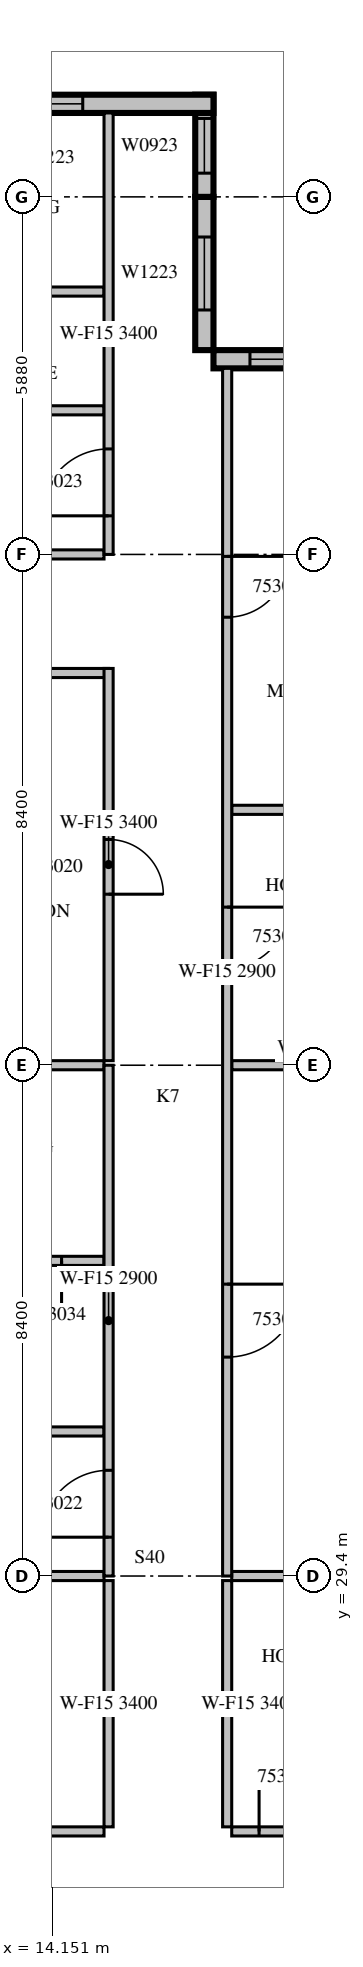
"""IFC4 building model, lengths in metres.
Left out: names, types, materials, properties, quantities, classifications, styles, units other than length and angle.
Written with IfcOpenShell. Run it as: python <this file> out.ifc"""

import sys

from ifc_helpers import new_model, si_unit, direction, frame, frame_2d, origin, place, context, subcontext, project, spatial, rectangle, extrude, source, transform, mapped, element, fill, save


model = new_model("IFC4")
c1 = context("Model", 3, precision=1e-05, world=origin(), true_north=direction((0.0, 1.0)))
c2 = subcontext(c1, "Body", "Model", "MODEL_VIEW")
j1 = project(units=[si_unit("LENGTHUNIT", "METRE"), si_unit("PLANEANGLEUNIT", "RADIAN")], contexts=[c1])
p1 = place(None, origin())
s1 = spatial("IfcSite", under=j1, at=p1, CompositionType="ELEMENT")
p2 = place(p1, origin())
s2 = spatial("IfcBuilding", under=s1, at=p2, CompositionType="ELEMENT")
p3 = place(p2, frame((0.0, 0.0, 234.8)))
s3 = spatial("IfcBuildingStorey", under=s2, at=p3, CompositionType="ELEMENT", Elevation=234.8)
m1 = source(origin(), c2, "Body", "SweptSolid", [
    extrude(rectangle(XDim=4.2, YDim=0.3, at=frame_2d((2.1, 0.0))), origin(), (0.0, 0.0, 1.0), 3.4),
])
p4 = place(p3, frame((21.0, 49.41, 0.0), z_axis=(0.0, 0.0, 1.0), x_axis=(-1.0, 0.0, 0.0)))
e1 = element("IfcWall", 1, at=p4, inside=s3, PredefinedType="STANDARD", context=c2, shape_type="MappedRepresentation", body=[
    mapped(m1, transform((0.0, 0.0, 0.0), scale=1.0)),
])
m2 = source(origin(), c2, "Body", "SweptSolid", [
    extrude(rectangle(XDim=3.0, YDim=2.3, at=frame_2d((1.5, 1.15))), frame((0.0, 0.16, 0.0), z_axis=(0.0, -1.0, 0.0), x_axis=(1.0, 0.0, 0.0)), (0.0, 0.0, 1.0), 0.32),
])
p5 = place(p4, frame((0.6, 0.0, 0.6)))
e2 = element("IfcOpeningElement", 2, at=p5, cuts=e1, PredefinedType="OPENING", context=c2, shape_type="MappedRepresentation", body=[
    mapped(m2, transform((0.0, 0.0, 0.0), scale=1.0)),
])
m3 = source(origin(), c2, "Body", "SweptSolid", [
    extrude(rectangle(XDim=2.52, YDim=0.3, at=frame_2d((1.26, 0.0))), origin(), (0.0, 0.0, 1.0), 3.4),
])
p6 = place(p3, frame((16.65, 49.56, 0.0), z_axis=(0.0, 0.0, 1.0), x_axis=(0.0, 1.0, 0.0)))
e3 = element("IfcWall", 3, at=p6, inside=s3, PredefinedType="STANDARD", context=c2, shape_type="MappedRepresentation", body=[
    mapped(m3, transform((0.0, 0.0, 0.0), scale=1.0)),
])
m4 = source(origin(), c2, "Body", "SweptSolid", [
    extrude(rectangle(XDim=1.2, YDim=2.3, at=frame_2d((0.6, 1.15))), frame((0.0, 0.16, 0.0), z_axis=(0.0, -1.0, 0.0), x_axis=(1.0, 0.0, 0.0)), (0.0, 0.0, 1.0), 0.32),
])
p7 = place(p6, frame((0.66, 0.0, 0.6)))
e4 = element("IfcOpeningElement", 4, at=p7, cuts=e3, PredefinedType="OPENING", context=c2, shape_type="MappedRepresentation", body=[
    mapped(m4, transform((0.0, 0.0, 0.0), scale=1.0)),
])
m5 = source(origin(), c2, "Body", "SweptSolid", [
    extrude(rectangle(XDim=1.68, YDim=0.3, at=frame_2d((0.84, 0.0))), origin(), (0.0, 0.0, 1.0), 3.4),
])
p8 = place(p3, frame((16.65, 52.08, 0.0), z_axis=(0.0, 0.0, 1.0), x_axis=(0.0, 1.0, 0.0)))
e5 = element("IfcWall", 5, at=p8, inside=s3, PredefinedType="STANDARD", context=c2, shape_type="MappedRepresentation", body=[
    mapped(m5, transform((0.0, 0.0, 0.0), scale=1.0)),
])
m6 = source(origin(), c2, "Body", "SweptSolid", [
    extrude(rectangle(XDim=0.9, YDim=2.3, at=frame_2d((0.45, 1.15))), frame((0.0, 0.16, 0.0), z_axis=(0.0, -1.0, 0.0), x_axis=(1.0, 0.0, 0.0)), (0.0, 0.0, 1.0), 0.32),
])
p9 = place(p8, frame((0.39, 0.0, 0.6)))
e6 = element("IfcOpeningElement", 6, at=p9, cuts=e5, PredefinedType="OPENING", context=c2, shape_type="MappedRepresentation", body=[
    mapped(m6, transform((0.0, 0.0, 0.0), scale=1.0)),
])
m7 = source(origin(), c2, "Body", "SweptSolid", [
    extrude(rectangle(XDim=10.5, YDim=0.3, at=frame_2d((5.25, 0.0))), origin(), (0.0, 0.0, 1.0), 3.4),
])
p10 = place(p3, frame((16.8, 53.61, 0.0), z_axis=(0.0, 0.0, 1.0), x_axis=(-1.0, 0.0, 0.0)))
e7 = element("IfcWall", 7, at=p10, inside=s3, PredefinedType="STANDARD", context=c2, shape_type="MappedRepresentation", body=[
    mapped(m7, transform((0.0, 0.0, 0.0), scale=1.0)),
])
p11 = place(p10, frame((2.15, 0.0, 0.6)))
e8 = element("IfcOpeningElement", 8, at=p11, cuts=e7, PredefinedType="OPENING", context=c2, shape_type="MappedRepresentation", body=[
    mapped(m4, transform((0.0, 0.0, 0.0), scale=1.0)),
])
m8 = source(origin(), c2, "Body", "SweptSolid", [
    extrude(rectangle(XDim=1.8, YDim=2.3, at=frame_2d((0.9, 1.15))), frame((0.0, 0.16, 0.0), z_axis=(0.0, -1.0, 0.0), x_axis=(1.0, 0.0, 0.0)), (0.0, 0.0, 1.0), 0.32),
])
p12 = place(p10, frame((8.025, 0.0, 0.6)))
e9 = element("IfcOpeningElement", 9, at=p12, cuts=e7, PredefinedType="OPENING", context=c2, shape_type="MappedRepresentation", body=[
    mapped(m8, transform((0.0, 0.0, 0.0), scale=1.0)),
])
m9 = source(origin(), c2, "Body", "SweptSolid", [
    extrude(rectangle(XDim=4.295, YDim=0.15, at=frame_2d((2.147, 0.0))), origin(), (0.0, 0.0, 1.0), 3.4),
])
p13 = place(p3, frame((10.705, 25.2, 0.0), z_axis=(0.0, 0.0, 1.0), x_axis=(1.0, 0.0, 0.0)))
e10 = element("IfcWall", 10, at=p13, inside=s3, PredefinedType="PARTITIONING", context=c2, shape_type="MappedRepresentation", body=[
    mapped(m9, transform((0.0, 0.0, 0.0), scale=1.0)),
])
m10 = source(origin(), c2, "Body", "SweptSolid", [
    extrude(rectangle(XDim=0.9, YDim=2.1, at=frame_2d((0.45, 1.05))), frame((0.0, 0.085, 0.0), z_axis=(0.0, -1.0, 0.0), x_axis=(1.0, 0.0, 0.0)), (0.0, 0.0, 1.0), 0.17),
])
p14 = place(p13, frame((2.283, 0.0, 0.0)))
e11 = element("IfcOpeningElement", 11, at=p14, cuts=e10, PredefinedType="OPENING", context=c2, shape_type="MappedRepresentation", body=[
    mapped(m10, transform((0.0, 0.0, 0.0), scale=1.0)),
])
m11 = source(origin(), c2, "Body", "SweptSolid", [
    extrude(rectangle(XDim=3.6, YDim=0.15, at=frame_2d((1.8, 0.0))), origin(), (0.0, 0.0, 1.0), 3.4),
])
p15 = place(p3, frame((17.1, 25.2, 0.0), z_axis=(0.0, 0.0, 1.0), x_axis=(1.0, 0.0, 0.0)))
e12 = element("IfcWall", 12, at=p15, inside=s3, PredefinedType="PARTITIONING", context=c2, shape_type="MappedRepresentation", body=[
    mapped(m11, transform((0.0, 0.0, 0.0), scale=1.0)),
])
p16 = place(p15, frame((0.45, 0.0, 0.0)))
e13 = element("IfcOpeningElement", 13, at=p16, cuts=e12, PredefinedType="OPENING", context=c2, shape_type="MappedRepresentation", body=[
    mapped(m10, transform((0.0, 0.0, 0.0), scale=1.0)),
])
m12 = source(origin(), c2, "Body", "SweptSolid", [
    extrude(rectangle(XDim=4.05, YDim=0.15, at=frame_2d((2.025, 0.0))), origin(), (0.0, 0.0, 1.0), 3.4),
])
for number, where, z_axis, x_axis in (
    (14, (15.075, 25.275, 0.0), (0.0, 0.0, 1.0), (0.0, 1.0, 0.0)),
    (15, (17.025, 29.325, 0.0), (0.0, 0.0, 1.0), (0.0, -1.0, 0.0)),
):
    element("IfcWall", number, at=place(p3, frame(where, z_axis=z_axis, x_axis=x_axis)), inside=s3, PredefinedType="PARTITIONING", context=c2, shape_type="MappedRepresentation", body=[
        mapped(m12, transform((0.0, 0.0, 0.0), scale=1.0)),
    ])
m13 = source(origin(), c2, "Body", "SweptSolid", [
    extrude(rectangle(XDim=4.101, YDim=0.15, at=frame_2d((2.05, 0.0))), origin(), (0.0, 0.0, 1.0), 3.4),
])
p17 = place(p3, frame((15.0, 29.4, 0.0), z_axis=(0.0, 0.0, 1.0), x_axis=(-1.0, 0.0, 0.0)))
e16 = element("IfcWall", 16, at=p17, inside=s3, PredefinedType="PARTITIONING", context=c2, shape_type="MappedRepresentation", body=[
    mapped(m13, transform((0.0, 0.0, 0.0), scale=1.0)),
])
m14 = source(origin(), c2, "Body", "SweptSolid", [
    extrude(rectangle(XDim=3.101, YDim=0.15, at=frame_2d((1.55, 0.0))), origin(), (0.0, 0.0, 1.0), 3.4),
])
p18 = place(p3, frame((20.201, 29.4, 0.0), z_axis=(0.0, 0.0, 1.0), x_axis=(-1.0, 0.0, 0.0)))
e17 = element("IfcWall", 17, at=p18, inside=s3, PredefinedType="PARTITIONING", context=c2, shape_type="MappedRepresentation", body=[
    mapped(m14, transform((0.0, 0.0, 0.0), scale=1.0)),
])
m15 = source(origin(), c2, "Body", "SweptSolid", [
    extrude(rectangle(XDim=3.975, YDim=0.15, at=frame_2d((1.988, 0.0))), origin(), (0.0, 0.0, 1.0), 3.4),
])
p19 = place(p3, frame((15.075, 44.25, 0.0), z_axis=(0.0, 0.0, 1.0), x_axis=(-1.0, 0.0, 0.0)))
e18 = element("IfcWall", 18, at=p19, inside=s3, PredefinedType="PARTITIONING", context=c2, shape_type="MappedRepresentation", body=[
    mapped(m15, transform((0.0, 0.0, 0.0), scale=1.0)),
])
m16 = source(origin(), c2, "Body", "SweptSolid", [
    extrude(rectangle(XDim=6.45, YDim=0.15, at=frame_2d((3.225, 0.0))), origin(), (0.0, 0.0, 1.0), 3.4),
])
p20 = place(p3, frame((15.075, 37.875, 0.0), z_axis=(0.0, 0.0, 1.0), x_axis=(0.0, 1.0, 0.0)))
e19 = element("IfcWall", 19, at=p20, inside=s3, PredefinedType="PARTITIONING", context=c2, shape_type="MappedRepresentation", body=[
    mapped(m16, transform((0.0, 0.0, 0.0), scale=1.0)),
])
p21 = place(p20, frame((2.737, 0.0, 0.0)))
e20 = element("IfcOpeningElement", 20, at=p21, cuts=e19, PredefinedType="OPENING", context=c2, shape_type="MappedRepresentation", body=[
    mapped(m10, transform((0.0, 0.0, 0.0), scale=1.0)),
])
p22 = place(p3, frame((15.0, 31.777, 0.0), z_axis=(0.0, 0.0, 1.0), x_axis=(-1.0, 0.0, 0.0)))
e21 = element("IfcWall", 21, at=p22, inside=s3, PredefinedType="PARTITIONING", context=c2, shape_type="MappedRepresentation", body=[
    mapped(m9, transform((0.0, 0.0, 0.0), scale=1.0)),
])
p23 = place(p22, frame((1.698, 0.0, 0.0)))
e22 = element("IfcOpeningElement", 22, at=p23, cuts=e21, PredefinedType="OPENING", context=c2, shape_type="MappedRepresentation", body=[
    mapped(m10, transform((0.0, 0.0, 0.0), scale=1.0)),
])
p24 = place(p3, frame((15.0, 34.583, 0.0), z_axis=(0.0, 0.0, 1.0), x_axis=(-1.0, 0.0, 0.0)))
e23 = element("IfcWall", 23, at=p24, inside=s3, PredefinedType="PARTITIONING", context=c2, shape_type="MappedRepresentation", body=[
    mapped(m9, transform((0.0, 0.0, 0.0), scale=1.0)),
])
p25 = place(p24, frame((1.698, 0.0, 0.0)))
e24 = element("IfcOpeningElement", 24, at=p25, cuts=e23, PredefinedType="OPENING", context=c2, shape_type="MappedRepresentation", body=[
    mapped(m10, transform((0.0, 0.0, 0.0), scale=1.0)),
])
p26 = place(p24, frame((0.698, 0.0, 0.0)))
e25 = element("IfcOpeningElement", 25, at=p26, cuts=e23, PredefinedType="OPENING", context=c2, shape_type="MappedRepresentation", body=[
    mapped(m10, transform((0.0, 0.0, 0.0), scale=1.0)),
])
p27 = place(p24, frame((2.698, 0.0, 0.0)))
e26 = element("IfcOpeningElement", 26, at=p27, cuts=e23, PredefinedType="OPENING", context=c2, shape_type="MappedRepresentation", body=[
    mapped(m10, transform((0.0, 0.0, 0.0), scale=1.0)),
])
p28 = place(p3, frame((15.0, 37.8, 0.0), z_axis=(0.0, 0.0, 1.0), x_axis=(-1.0, 0.0, 0.0)))
e27 = element("IfcWall", 27, at=p28, inside=s3, PredefinedType="PARTITIONING", context=c2, shape_type="MappedRepresentation", body=[
    mapped(m13, transform((0.0, 0.0, 0.0), scale=1.0)),
])
m17 = source(origin(), c2, "Body", "SweptSolid", [
    extrude(rectangle(XDim=3.95, YDim=0.15, at=frame_2d((1.975, 0.0))), origin(), (0.0, 0.0, 1.0), 3.4),
])
for number, where, z_axis, x_axis in (
    (28, (15.0, 48.57, 0.0), (0.0, 0.0, 1.0), (-1.0, 0.0, 0.0)),
    (29, (15.0, 50.523, 0.0), (0.0, 0.0, 1.0), (-1.0, 0.0, 0.0)),
    (30, (15.0, 46.2, 0.0), (0.0, 0.0, 1.0), (-1.0, 0.0, 0.0)),
):
    element("IfcWall", number, at=place(p3, frame(where, z_axis=z_axis, x_axis=x_axis)), inside=s3, PredefinedType="PARTITIONING", context=c2, shape_type="MappedRepresentation", body=[
        mapped(m17, transform((0.0, 0.0, 0.0), scale=1.0)),
    ])
p29 = place(p3, frame((20.201, 37.8, 0.0), z_axis=(0.0, 0.0, 1.0), x_axis=(-1.0, 0.0, 0.0)))
e31 = element("IfcWall", 31, at=p29, inside=s3, PredefinedType="PARTITIONING", context=c2, shape_type="MappedRepresentation", body=[
    mapped(m14, transform((0.0, 0.0, 0.0), scale=1.0)),
])
p30 = place(p3, frame((20.7, 42.0, 0.0), z_axis=(0.0, 0.0, 1.0), x_axis=(-1.0, 0.0, 0.0)))
e32 = element("IfcWall", 32, at=p30, inside=s3, PredefinedType="PARTITIONING", context=c2, shape_type="MappedRepresentation", body=[
    mapped(m11, transform((0.0, 0.0, 0.0), scale=1.0)),
])
m18 = source(origin(), c2, "Body", "SweptSolid", [
    extrude(rectangle(XDim=8.4, YDim=0.15, at=frame_2d((4.2, 0.0))), origin(), (0.0, 0.0, 1.0), 2.9),
])
p31 = place(p3, frame((15.075, 29.4, 0.0), z_axis=(0.0, 0.0, 1.0), x_axis=(0.0, 1.0, 0.0)))
e33 = element("IfcWall", 33, at=p31, inside=s3, PredefinedType="PARTITIONING", context=c2, shape_type="MappedRepresentation", body=[
    mapped(m18, transform((0.0, 0.0, 0.0), scale=1.0)),
])
m19 = source(origin(), c2, "Body", "SweptSolid", [
    extrude(rectangle(XDim=1.1, YDim=2.1, at=frame_2d((0.55, 1.05))), frame((0.0, 0.085, 0.0), z_axis=(0.0, -1.0, 0.0), x_axis=(1.0, 0.0, 0.0)), (0.0, 0.0, 1.0), 0.17),
])
p32 = place(p31, frame((0.638, 0.0, 0.0)))
e34 = element("IfcOpeningElement", 34, at=p32, cuts=e33, PredefinedType="OPENING", context=c2, shape_type="MappedRepresentation", body=[
    mapped(m19, transform((0.0, 0.0, 0.0), scale=1.0)),
])
m20 = source(origin(), c2, "Body", "SweptSolid", [
    extrude(rectangle(XDim=7.26, YDim=0.15, at=frame_2d((3.63, 0.0))), origin(), (0.0, 0.0, 1.0), 3.4),
])
p33 = place(p3, frame((15.075, 46.2, 0.0), z_axis=(0.0, 0.0, 1.0), x_axis=(0.0, 1.0, 0.0)))
e35 = element("IfcWall", 35, at=p33, inside=s3, PredefinedType="PARTITIONING", context=c2, shape_type="MappedRepresentation", body=[
    mapped(m20, transform((0.0, 0.0, 0.0), scale=1.0)),
])
p34 = place(p33, frame((0.635, 0.0, 0.0)))
e36 = element("IfcOpeningElement", 36, at=p34, cuts=e35, PredefinedType="OPENING", context=c2, shape_type="MappedRepresentation", body=[
    mapped(m19, transform((0.0, 0.0, 0.0), scale=1.0)),
])
m21 = source(origin(), c2, "Body", "SweptSolid", [
    extrude(rectangle(XDim=19.86, YDim=0.15, at=frame_2d((9.93, 0.0))), origin(), (0.0, 0.0, 1.0), 2.9),
])
p35 = place(p3, frame((17.025, 49.26, 0.0), z_axis=(0.0, 0.0, 1.0), x_axis=(0.0, -1.0, 0.0)))
e37 = element("IfcWall", 37, at=p35, inside=s3, PredefinedType="PARTITIONING", context=c2, shape_type="MappedRepresentation", body=[
    mapped(m21, transform((0.0, 0.0, 0.0), scale=1.0)),
])
m22 = source(origin(), c2, "Body", "SweptSolid", [
    extrude(rectangle(XDim=1.2, YDim=2.1, at=frame_2d((0.6, 1.05))), frame((0.0, 0.085, 0.0), z_axis=(0.0, -1.0, 0.0), x_axis=(1.0, 0.0, 0.0)), (0.0, 0.0, 1.0), 0.17),
])
p36 = place(p35, frame((15.06, 0.0, 0.0)))
e38 = element("IfcOpeningElement", 38, at=p36, cuts=e37, PredefinedType="OPENING", context=c2, shape_type="MappedRepresentation", body=[
    mapped(m22, transform((0.0, 0.0, 0.0), scale=1.0)),
])
m23 = source(origin(), c2, "Body", "SweptSolid", [
    extrude(rectangle(XDim=1.0, YDim=2.1, at=frame_2d((0.5, 1.05))), frame((0.0, 0.085, 0.0), z_axis=(0.0, -1.0, 0.0), x_axis=(1.0, 0.0, 0.0)), (0.0, 0.0, 1.0), 0.17),
])
p37 = place(p35, frame((8.86, 0.0, 0.0)))
e39 = element("IfcOpeningElement", 39, at=p37, cuts=e37, PredefinedType="OPENING", context=c2, shape_type="MappedRepresentation", body=[
    mapped(m23, transform((0.0, 0.0, 0.0), scale=1.0)),
])
p38 = place(p35, frame((3.092, 0.0, 0.0)))
e40 = element("IfcOpeningElement", 40, at=p38, cuts=e37, PredefinedType="OPENING", context=c2, shape_type="MappedRepresentation", body=[
    mapped(m23, transform((0.0, 0.0, 0.0), scale=1.0)),
])
m24 = source(origin(), c2, "Body", "SweptSolid", [
    extrude(rectangle(XDim=3.0, YDim=2.3, at=frame_2d((1.5, 1.15))), frame((0.0, 0.03, 0.0), z_axis=(0.0, -1.0, 0.0), x_axis=(1.0, 0.0, 0.0)), (0.0, 0.0, 1.0), 0.06),
])
p39 = place(p5, origin())
e41 = element("IfcWindow", 41, at=p39, inside=s3, PartitioningType="SINGLE_PANEL", PredefinedType="WINDOW", context=c2, shape_type="MappedRepresentation", body=[
    mapped(m24, transform((0.0, 0.0, 0.0), scale=1.0)),
])
fill(e2, e41)
m25 = source(origin(), c2, "Body", "SweptSolid", [
    extrude(rectangle(XDim=1.2, YDim=2.3, at=frame_2d((0.6, 1.15))), frame((0.0, 0.03, 0.0), z_axis=(0.0, -1.0, 0.0), x_axis=(1.0, 0.0, 0.0)), (0.0, 0.0, 1.0), 0.06),
])
p40 = place(p7, origin())
e42 = element("IfcWindow", 42, at=p40, inside=s3, PartitioningType="SINGLE_PANEL", PredefinedType="WINDOW", context=c2, shape_type="MappedRepresentation", body=[
    mapped(m25, transform((0.0, 0.0, 0.0), scale=1.0)),
])
fill(e4, e42)
m26 = source(origin(), c2, "Body", "SweptSolid", [
    extrude(rectangle(XDim=0.9, YDim=2.3, at=frame_2d((0.45, 1.15))), frame((0.0, 0.03, 0.0), z_axis=(0.0, -1.0, 0.0), x_axis=(1.0, 0.0, 0.0)), (0.0, 0.0, 1.0), 0.06),
])
p41 = place(p9, origin())
e43 = element("IfcWindow", 43, at=p41, inside=s3, PartitioningType="SINGLE_PANEL", PredefinedType="WINDOW", context=c2, shape_type="MappedRepresentation", body=[
    mapped(m26, transform((0.0, 0.0, 0.0), scale=1.0)),
])
fill(e6, e43)
p42 = place(p11, origin())
e44 = element("IfcWindow", 44, at=p42, inside=s3, PartitioningType="SINGLE_PANEL", PredefinedType="WINDOW", context=c2, shape_type="MappedRepresentation", body=[
    mapped(m25, transform((0.0, 0.0, 0.0), scale=1.0)),
])
fill(e8, e44)
m27 = source(origin(), c2, "Body", "SweptSolid", [
    extrude(rectangle(XDim=0.9, YDim=2.1, at=frame_2d((0.45, 1.05))), frame((0.0, 0.025, 0.0), z_axis=(0.0, -1.0, 0.0), x_axis=(1.0, 0.0, 0.0)), (0.0, 0.0, 1.0), 0.05),
])
p43 = place(p16, origin())
e45 = element("IfcDoor", 45, at=p43, inside=s3, OperationType="SINGLE_SWING_LEFT", PredefinedType="DOOR", context=c2, shape_type="MappedRepresentation", body=[
    mapped(m27, transform((0.0, 0.0, 0.0), scale=1.0)),
])
fill(e13, e45)
p44 = place(p21, origin())
e46 = element("IfcDoor", 46, at=p44, inside=s3, OperationType="SINGLE_SWING_RIGHT", PredefinedType="DOOR", context=c2, shape_type="MappedRepresentation", body=[
    mapped(m27, transform((0.0, 0.0, 0.0), scale=1.0)),
])
fill(e20, e46)
m28 = source(origin(), c2, "Body", "SweptSolid", [
    extrude(rectangle(XDim=1.1, YDim=2.1, at=frame_2d((0.55, 1.05))), frame((0.0, 0.025, 0.0), z_axis=(0.0, -1.0, 0.0), x_axis=(1.0, 0.0, 0.0)), (0.0, 0.0, 1.0), 0.05),
])
p45 = place(p32, origin())
e47 = element("IfcDoor", 47, at=p45, inside=s3, OperationType="SINGLE_SWING_LEFT", PredefinedType="DOOR", context=c2, shape_type="MappedRepresentation", body=[
    mapped(m28, transform((0.0, 0.0, 0.0), scale=1.0)),
])
fill(e34, e47)
p46 = place(p34, origin())
e48 = element("IfcDoor", 48, at=p46, inside=s3, OperationType="SINGLE_SWING_LEFT", PredefinedType="DOOR", context=c2, shape_type="MappedRepresentation", body=[
    mapped(m28, transform((0.0, 0.0, 0.0), scale=1.0)),
])
fill(e36, e48)
m29 = source(origin(), c2, "Body", "SweptSolid", [
    extrude(rectangle(XDim=1.2, YDim=2.1, at=frame_2d((0.6, 1.05))), frame((0.0, 0.025, 0.0), z_axis=(0.0, -1.0, 0.0), x_axis=(1.0, 0.0, 0.0)), (0.0, 0.0, 1.0), 0.05),
])
p47 = place(p36, origin())
e49 = element("IfcDoor", 49, at=p47, inside=s3, OperationType="SINGLE_SWING_LEFT", PredefinedType="DOOR", context=c2, shape_type="MappedRepresentation", body=[
    mapped(m29, transform((0.0, 0.0, 0.0), scale=1.0)),
])
fill(e38, e49)
m30 = source(origin(), c2, "Body", "SweptSolid", [
    extrude(rectangle(XDim=1.0, YDim=2.1, at=frame_2d((0.5, 1.05))), frame((0.0, 0.025, 0.0), z_axis=(0.0, -1.0, 0.0), x_axis=(1.0, 0.0, 0.0)), (0.0, 0.0, 1.0), 0.05),
])
p48 = place(p37, origin())
e50 = element("IfcDoor", 50, at=p48, inside=s3, OperationType="SINGLE_SWING_LEFT", PredefinedType="DOOR", context=c2, shape_type="MappedRepresentation", body=[
    mapped(m30, transform((0.0, 0.0, 0.0), scale=1.0)),
])
fill(e39, e50)
p49 = place(p38, origin())
e51 = element("IfcDoor", 51, at=p49, inside=s3, OperationType="SINGLE_SWING_LEFT", PredefinedType="DOOR", context=c2, shape_type="MappedRepresentation", body=[
    mapped(m30, transform((0.0, 0.0, 0.0), scale=1.0)),
])
fill(e40, e51)
p50 = place(p26, origin())
e52 = element("IfcDoor", 52, at=p50, inside=s3, OperationType="SINGLE_SWING_LEFT", PredefinedType="DOOR", context=c2, shape_type="MappedRepresentation", body=[
    mapped(m27, transform((0.0, 0.0, 0.0), scale=1.0)),
])
fill(e25, e52)
save(model, sys.argv[1])
